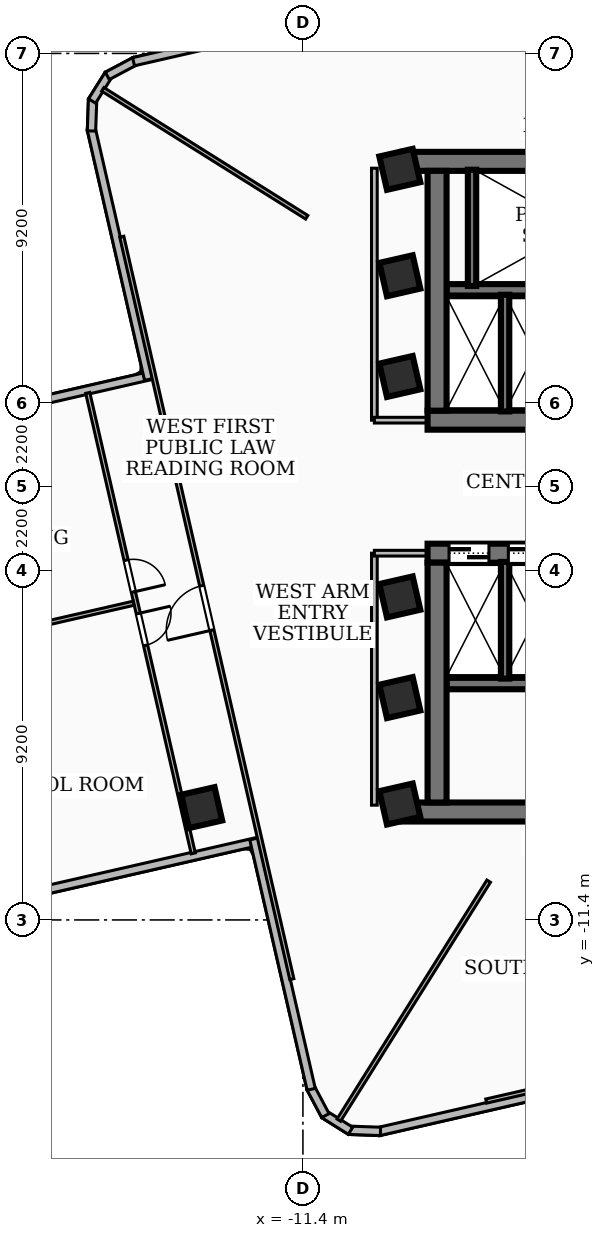
"""IFC4 building model, lengths in metres.
Left out: names, types, materials, properties, quantities, classifications, styles, units other than length and angle.
Written with IfcOpenShell. Run it as: python <this file> out.ifc"""

import sys

from ifc_helpers import new_model, si_unit, direction, frame, frame_2d, origin, origin_2d, place, context, subcontext, project, spatial, rectangle, extrude, element, fill, save


model = new_model("IFC4")
c1 = context("Model", 3, precision=1e-05, world=origin(), true_north=direction((0.0, 1.0)))
c2 = subcontext(c1, "Body", "Model", "MODEL_VIEW")
j1 = project(units=[si_unit("LENGTHUNIT", "METRE"), si_unit("PLANEANGLEUNIT", "RADIAN")], contexts=[c1])
p1 = place(None, origin())
s1 = spatial("IfcSite", under=j1, at=p1, CompositionType="ELEMENT")
p2 = place(p1, origin())
s2 = spatial("IfcBuilding", under=s1, at=p2, CompositionType="ELEMENT")
p3 = place(p2, frame((0.0, 0.0, 123.48)))
s3 = spatial("IfcBuildingStorey", under=s2, at=p3, CompositionType="ELEMENT", Elevation=123.48)
p4 = place(p3, frame((-8.78, 8.56, 0.0), z_axis=(0.0, 0.0, 1.0), x_axis=(1.0, 0.0, 0.0)))
e1 = element("IfcWall", 1, at=p4, inside=s3, PredefinedType="SHEAR", context=c2, shape_type="SweptSolid", body=[
    extrude(rectangle(XDim=17.56, YDim=0.5, at=frame_2d((8.78, 0.0))), origin(), (0.0, 0.0, 1.0), 3.34),
])
p5 = place(p3, frame((8.12, 1.75, 0.0), z_axis=(0.0, 0.0, 1.0), x_axis=(-1.0, 0.0, 0.0)))
e2 = element("IfcWall", 2, at=p5, inside=s3, PredefinedType="SHEAR", context=c2, shape_type="SweptSolid", body=[
    extrude(rectangle(XDim=16.24, YDim=0.5, at=frame_2d((8.12, 0.0))), origin(), (0.0, 0.0, 1.0), 3.34),
])
p6 = place(p5, frame((7.45, 0.0, 0.0)))
e3 = element("IfcOpeningElement", 3, at=p6, cuts=e2, PredefinedType="OPENING", context=c2, shape_type="SweptSolid", body=[
    extrude(rectangle(XDim=1.0, YDim=2.1, at=frame_2d((0.5, 1.05))), frame((0.0, 0.26, 0.0), z_axis=(0.0, -1.0, 0.0), x_axis=(1.0, 0.0, 0.0)), (0.0, 0.0, 1.0), 0.52),
])
p7 = place(p5, frame((3.4, 0.0, 0.0)))
e4 = element("IfcOpeningElement", 4, at=p7, cuts=e2, PredefinedType="OPENING", context=c2, shape_type="SweptSolid", body=[
    extrude(rectangle(XDim=0.9, YDim=2.06, at=frame_2d((0.45, 1.03))), frame((0.0, 0.26, 0.0), z_axis=(0.0, -1.0, 0.0), x_axis=(1.0, 0.0, 0.0)), (0.0, 0.0, 1.0), 0.52),
])
p8 = place(p5, frame((1.1, 0.0, 0.0)))
e5 = element("IfcOpeningElement", 5, at=p8, cuts=e2, PredefinedType="OPENING", context=c2, shape_type="SweptSolid", body=[
    extrude(rectangle(XDim=0.9, YDim=2.06, at=frame_2d((0.45, 1.03))), frame((0.0, 0.26, 0.0), z_axis=(0.0, -1.0, 0.0), x_axis=(1.0, 0.0, 0.0)), (0.0, 0.0, 1.0), 0.52),
])
p9 = place(p3, frame((-7.87, 2.0, 0.0), z_axis=(0.0, 0.0, 1.0), x_axis=(0.0, 1.0, 0.0)))
e6 = element("IfcWall", 6, at=p9, inside=s3, PredefinedType="SHEAR", context=c2, shape_type="SweptSolid", body=[
    extrude(rectangle(XDim=6.31, YDim=0.5, at=frame_2d((3.155, 0.0))), origin(), (0.0, 0.0, 1.0), 3.34),
])
p10 = place(p3, frame((7.62, 5.18, 0.0), z_axis=(0.0, 0.0, 1.0), x_axis=(-1.0, 0.0, 0.0)))
e7 = element("IfcWall", 7, at=p10, inside=s3, PredefinedType="SOLIDWALL", context=c2, shape_type="SweptSolid", body=[
    extrude(rectangle(XDim=15.24, YDim=0.3, at=frame_2d((7.62, 0.0))), origin(), (0.0, 0.0, 1.0), 3.34),
])
p11 = place(p10, frame((5.77, 0.0, 0.0)))
e8 = element("IfcOpeningElement", 8, at=p11, cuts=e7, PredefinedType="OPENING", context=c2, shape_type="SweptSolid", body=[
    extrude(rectangle(XDim=1.1, YDim=2.15, at=frame_2d((0.55, 1.075))), frame((0.0, 0.16, 0.0), z_axis=(0.0, -1.0, 0.0), x_axis=(1.0, 0.0, 0.0)), (0.0, 0.0, 1.0), 0.32),
])
p12 = place(p10, frame((2.97, 0.0, 0.0)))
e9 = element("IfcOpeningElement", 9, at=p12, cuts=e7, PredefinedType="OPENING", context=c2, shape_type="SweptSolid", body=[
    extrude(rectangle(XDim=1.1, YDim=2.15, at=frame_2d((0.55, 1.075))), frame((0.0, 0.16, 0.0), z_axis=(0.0, -1.0, 0.0), x_axis=(1.0, 0.0, 0.0)), (0.0, 0.0, 1.0), 0.32),
])
p13 = place(p10, frame((7.97, 0.0, 0.0)))
e10 = element("IfcOpeningElement", 10, at=p13, cuts=e7, PredefinedType="OPENING", context=c2, shape_type="SweptSolid", body=[
    extrude(rectangle(XDim=1.0, YDim=2.1, at=frame_2d((0.5, 1.05))), frame((0.0, 0.16, 0.0), z_axis=(0.0, -1.0, 0.0), x_axis=(1.0, 0.0, 0.0)), (0.0, 0.0, 1.0), 0.32),
])
p14 = place(p3, frame((8.78, -8.56, 0.0), z_axis=(0.0, 0.0, 1.0), x_axis=(-1.0, 0.0, 0.0)))
e11 = element("IfcWall", 11, at=p14, inside=s3, PredefinedType="SHEAR", context=c2, shape_type="SweptSolid", body=[
    extrude(rectangle(XDim=17.56, YDim=0.5, at=frame_2d((8.78, 0.0))), origin(), (0.0, 0.0, 1.0), 3.34),
])
p15 = place(p3, frame((-8.12, -1.75, 0.0), z_axis=(0.0, 0.0, 1.0), x_axis=(1.0, 0.0, 0.0)))
e12 = element("IfcWall", 12, at=p15, inside=s3, PredefinedType="SHEAR", context=c2, shape_type="SweptSolid", body=[
    extrude(rectangle(XDim=16.24, YDim=0.5, at=frame_2d((8.12, 0.0))), origin(), (0.0, 0.0, 1.0), 3.34),
])
p16 = place(p15, frame((7.45, 0.0, 0.0)))
e13 = element("IfcOpeningElement", 13, at=p16, cuts=e12, PredefinedType="OPENING", context=c2, shape_type="SweptSolid", body=[
    extrude(rectangle(XDim=1.0, YDim=2.1, at=frame_2d((0.5, 1.05))), frame((0.0, 0.26, 0.0), z_axis=(0.0, -1.0, 0.0), x_axis=(1.0, 0.0, 0.0)), (0.0, 0.0, 1.0), 0.52),
])
p17 = place(p15, frame((12.65, 0.0, 0.0)))
e14 = element("IfcOpeningElement", 14, at=p17, cuts=e12, PredefinedType="OPENING", context=c2, shape_type="SweptSolid", body=[
    extrude(rectangle(XDim=0.9, YDim=2.06, at=frame_2d((0.45, 1.03))), frame((0.0, 0.26, 0.0), z_axis=(0.0, -1.0, 0.0), x_axis=(1.0, 0.0, 0.0)), (0.0, 0.0, 1.0), 0.52),
])
p18 = place(p15, frame((0.565, 0.0, 0.0)))
e15 = element("IfcOpeningElement", 15, at=p18, cuts=e12, PredefinedType="OPENING", context=c2, shape_type="SweptSolid", body=[
    extrude(rectangle(XDim=1.05, YDim=2.15, at=frame_2d((0.525, 1.075))), frame((0.0, 0.26, 0.0), z_axis=(0.0, -1.0, 0.0), x_axis=(1.0, 0.0, 0.0)), (0.0, 0.0, 1.0), 0.52),
])
p19 = place(p15, frame((2.125, 0.0, 0.0)))
e16 = element("IfcOpeningElement", 16, at=p19, cuts=e12, PredefinedType="OPENING", context=c2, shape_type="SweptSolid", body=[
    extrude(rectangle(XDim=1.05, YDim=2.15, at=frame_2d((0.525, 1.075))), frame((0.0, 0.26, 0.0), z_axis=(0.0, -1.0, 0.0), x_axis=(1.0, 0.0, 0.0)), (0.0, 0.0, 1.0), 0.52),
])
p20 = place(p15, frame((3.685, 0.0, 0.0)))
e17 = element("IfcOpeningElement", 17, at=p20, cuts=e12, PredefinedType="OPENING", context=c2, shape_type="SweptSolid", body=[
    extrude(rectangle(XDim=1.05, YDim=2.15, at=frame_2d((0.525, 1.075))), frame((0.0, 0.26, 0.0), z_axis=(0.0, -1.0, 0.0), x_axis=(1.0, 0.0, 0.0)), (0.0, 0.0, 1.0), 0.52),
])
p21 = place(p3, frame((-7.87, -8.31, 0.0), z_axis=(0.0, 0.0, 1.0), x_axis=(0.0, 1.0, 0.0)))
e18 = element("IfcWall", 18, at=p21, inside=s3, PredefinedType="SHEAR", context=c2, shape_type="SweptSolid", body=[
    extrude(rectangle(XDim=6.31, YDim=0.5, at=frame_2d((3.155, 0.0))), origin(), (0.0, 0.0, 1.0), 3.34),
])
p22 = place(p3, frame((-7.62, -5.18, 0.0), z_axis=(0.0, 0.0, 1.0), x_axis=(1.0, 0.0, 0.0)))
e19 = element("IfcWall", 19, at=p22, inside=s3, PredefinedType="SOLIDWALL", context=c2, shape_type="SweptSolid", body=[
    extrude(rectangle(XDim=15.24, YDim=0.3, at=frame_2d((7.62, 0.0))), origin(), (0.0, 0.0, 1.0), 3.34),
])
p23 = place(p22, frame((5.77, 0.0, 0.0)))
e20 = element("IfcOpeningElement", 20, at=p23, cuts=e19, PredefinedType="OPENING", context=c2, shape_type="SweptSolid", body=[
    extrude(rectangle(XDim=1.1, YDim=2.15, at=frame_2d((0.55, 1.075))), frame((0.0, 0.16, 0.0), z_axis=(0.0, -1.0, 0.0), x_axis=(1.0, 0.0, 0.0)), (0.0, 0.0, 1.0), 0.32),
])
p24 = place(p22, frame((7.97, 0.0, 0.0)))
e21 = element("IfcOpeningElement", 21, at=p24, cuts=e19, PredefinedType="OPENING", context=c2, shape_type="SweptSolid", body=[
    extrude(rectangle(XDim=1.0, YDim=2.1, at=frame_2d((0.5, 1.05))), frame((0.0, 0.16, 0.0), z_axis=(0.0, -1.0, 0.0), x_axis=(1.0, 0.0, 0.0)), (0.0, 0.0, 1.0), 0.32),
])
p25 = place(p3, frame((-6.95, 5.28, 0.0), z_axis=(0.0, 0.0, 1.0), x_axis=(0.0, 1.0, 0.0)))
e22 = element("IfcWall", 22, at=p25, inside=s3, PredefinedType="SOLIDWALL", context=c2, shape_type="SweptSolid", body=[
    extrude(rectangle(XDim=3.06, YDim=0.22, at=frame_2d((1.53, 0.0))), origin(), (0.0, 0.0, 1.0), 3.34),
])
for number, where, z_axis, x_axis in (
    (23, (-6.08, 1.98, 0.0), (0.0, 0.0, 1.0), (0.0, 1.0, 0.0)),
    (24, (-6.08, -5.05, 0.0), (0.0, 0.0, 1.0), (0.0, 1.0, 0.0)),
):
    element("IfcWall", number, at=place(p3, frame(where, z_axis=z_axis, x_axis=x_axis)), inside=s3, PredefinedType="SOLIDWALL", context=c2, shape_type="SweptSolid", body=[
        extrude(rectangle(XDim=3.07, YDim=0.22, at=frame_2d((1.535, 0.0))), origin(), (0.0, 0.0, 1.0), 3.34),
    ])
for number, where, z_axis, x_axis in (
    (25, (-8.85, -5.55, 0.0), (0.0, 0.0, 1.0), (0.975, 0.223, 0.0)),
    (26, (-8.85, -2.9, 0.0), (0.0, 0.0, 1.0), (0.975, 0.223, 0.0)),
    (27, (-8.85, 2.9, 0.0), (0.0, 0.0, 1.0), (0.975, 0.223, 0.0)),
    (28, (-8.85, 5.55, 0.0), (0.0, 0.0, 1.0), (0.975, 0.223, 0.0)),
    (29, (-8.85, 8.35, 0.0), (0.0, 0.0, 1.0), (0.975, 0.223, 0.0)),
    (30, (-8.85, -8.35, 0.0), (0.0, 0.0, 1.0), (0.975, 0.223, 0.0)),
    (31, (-14.064, -8.445, 0.0), (0.0, 0.0, 1.0), (0.975, 0.223, 0.0)),
):
    element("IfcColumn", number, at=place(p3, frame(where, z_axis=z_axis, x_axis=x_axis)), inside=s3, PredefinedType="COLUMN", context=c2, shape_type="SweptSolid", body=[
        extrude(rectangle(XDim=0.9, YDim=0.9, at=origin_2d()), origin(), (0.0, 0.0, 1.0), 3.6),
    ])
p26 = place(p3, frame((-12.585, -9.335, 0.0), z_axis=(0.0, 0.0, 1.0), x_axis=(-0.974754036658, -0.223281365141, 0.0)))
e32 = element("IfcWall", 32, at=p26, inside=s3, PredefinedType="SOLIDWALL", context=c2, shape_type="SweptSolid", body=[
    extrude(rectangle(XDim=13.459, YDim=0.22, at=frame_2d((6.729, 0.0))), origin(), (0.0, 0.0, 1.0), 2.644),
])
p27 = place(p3, frame((-28.512, -0.078, 0.0), z_axis=(0.0, 0.0, 1.0), x_axis=(0.974753462872, 0.223283870038, 0.0)))
e33 = element("IfcWall", 33, at=p27, inside=s3, PredefinedType="SOLIDWALL", context=c2, shape_type="SweptSolid", body=[
    extrude(rectangle(XDim=13.458, YDim=0.22, at=frame_2d((6.729, 0.0))), origin(), (0.0, 0.0, 1.0), 3.34),
])
p28 = place(p27, frame((1.1, 0.0, 0.85)))
e34 = element("IfcOpeningElement", 34, at=p28, cuts=e33, PredefinedType="OPENING", context=c2, shape_type="SweptSolid", body=[
    extrude(rectangle(XDim=1.5, YDim=1.5, at=frame_2d((0.75, 0.75))), frame((0.0, 0.12, 0.0), z_axis=(0.0, -1.0, 0.0), x_axis=(1.0, 0.0, 0.0)), (0.0, 0.0, 1.0), 0.24),
])
p29 = place(p3, frame((-15.46, 2.821, 0.0), z_axis=(0.0, 0.0, 1.0), x_axis=(-0.223278912438, 0.974754598481, 0.0)))
e35 = element("IfcWall", 35, at=p29, inside=s3, PredefinedType="SOLIDWALL", context=c2, shape_type="SweptSolid", body=[
    extrude(rectangle(XDim=6.759, YDim=0.22, at=frame_2d((3.379, 0.0))), origin(), (0.0, 0.0, 1.0), 3.34),
])
p30 = place(p3, frame((-16.964, 9.36, 0.0), z_axis=(0.0, 0.0, 1.0), x_axis=(0.035983706773, 0.999352376715, 0.0)))
e36 = element("IfcWall", 36, at=p30, inside=s3, PredefinedType="SOLIDWALL", context=c2, shape_type="SweptSolid", body=[
    extrude(rectangle(XDim=0.834, YDim=0.22, at=frame_2d((0.417, 0.0))), origin(), (0.0, 0.0, 1.0), 3.34),
])
p31 = place(p3, frame((-16.948, 10.148, 0.0), z_axis=(0.0, 0.0, 1.0), x_axis=(0.531096868492, 0.847311109497, 0.0)))
e37 = element("IfcWall", 37, at=p31, inside=s3, PredefinedType="SOLIDWALL", context=c2, shape_type="SweptSolid", body=[
    extrude(rectangle(XDim=0.819, YDim=0.22, at=frame_2d((0.41, 0.0))), origin(), (0.0, 0.0, 1.0), 3.34),
])
p32 = place(p3, frame((-16.548, 10.809, 0.0), z_axis=(0.0, 0.0, 1.0), x_axis=(0.883460266876, 0.468506090516, 0.0)))
e38 = element("IfcWall", 38, at=p32, inside=s3, PredefinedType="SOLIDWALL", context=c2, shape_type="SweptSolid", body=[
    extrude(rectangle(XDim=0.834, YDim=0.22, at=frame_2d((0.417, 0.0))), origin(), (0.0, 0.0, 1.0), 3.34),
])
p33 = place(p3, frame((-15.857, 11.182, 0.0), z_axis=(0.0, 0.0, 1.0), x_axis=(0.974754598481, 0.223278912438, 0.0)))
e39 = element("IfcWall", 39, at=p33, inside=s3, PredefinedType="SOLIDWALL", context=c2, shape_type="SweptSolid", body=[
    extrude(rectangle(XDim=6.759, YDim=0.22, at=frame_2d((3.379, 0.0))), origin(), (0.0, 0.0, 1.0), 3.34),
])
p34 = place(p3, frame((-2.821, -15.46, 0.0), z_axis=(0.0, 0.0, 1.0), x_axis=(-0.974754598481, -0.223278912438, 0.0)))
e40 = element("IfcWall", 40, at=p34, inside=s3, PredefinedType="SOLIDWALL", context=c2, shape_type="SweptSolid", body=[
    extrude(rectangle(XDim=6.759, YDim=0.22, at=frame_2d((3.379, 0.0))), origin(), (0.0, 0.0, 1.0), 2.57),
])
p35 = place(p3, frame((-9.36, -16.964, 0.0), z_axis=(0.0, 0.0, 1.0), x_axis=(-0.999352376715, 0.035983706773, 0.0)))
e41 = element("IfcWall", 41, at=p35, inside=s3, PredefinedType="SOLIDWALL", context=c2, shape_type="SweptSolid", body=[
    extrude(rectangle(XDim=0.834, YDim=0.22, at=frame_2d((0.417, 0.0))), origin(), (0.0, 0.0, 1.0), 3.34),
])
p36 = place(p3, frame((-10.148, -16.948, 0.0), z_axis=(0.0, 0.0, 1.0), x_axis=(-0.847311109497, 0.531096868492, 0.0)))
e42 = element("IfcWall", 42, at=p36, inside=s3, PredefinedType="SOLIDWALL", context=c2, shape_type="SweptSolid", body=[
    extrude(rectangle(XDim=0.819, YDim=0.22, at=frame_2d((0.41, 0.0))), origin(), (0.0, 0.0, 1.0), 3.34),
])
p37 = place(p3, frame((-10.809, -16.548, 0.0), z_axis=(0.0, 0.0, 1.0), x_axis=(-0.468506090516, 0.883460266876, 0.0)))
e43 = element("IfcWall", 43, at=p37, inside=s3, PredefinedType="SOLIDWALL", context=c2, shape_type="SweptSolid", body=[
    extrude(rectangle(XDim=0.834, YDim=0.22, at=frame_2d((0.417, 0.0))), origin(), (0.0, 0.0, 1.0), 3.34),
])
p38 = place(p3, frame((-11.182, -15.857, 0.0), z_axis=(0.0, 0.0, 1.0), x_axis=(-0.223278912438, 0.974754598481, 0.0)))
e44 = element("IfcWall", 44, at=p38, inside=s3, PredefinedType="SOLIDWALL", context=c2, shape_type="SweptSolid", body=[
    extrude(rectangle(XDim=6.759, YDim=0.22, at=frame_2d((3.379, 0.0))), origin(), (0.0, 0.0, 1.0), 2.644),
])
p39 = place(p3, frame((-9.52, 1.75, 0.0), z_axis=(0.0, 0.0, 1.0), x_axis=(0.0, 1.0, 0.0)))
e45 = element("IfcWall", 45, at=p39, inside=s3, PredefinedType="PARTITIONING", context=c2, shape_type="SweptSolid", body=[
    extrude(rectangle(XDim=6.63, YDim=0.15, at=frame_2d((3.315, 0.0))), origin(), (0.0, 0.0, 1.0), 2.57),
])
p40 = place(p3, frame((-7.85, 1.75, 0.0), z_axis=(0.0, 0.0, 1.0), x_axis=(-1.0, 0.0, 0.0)))
e46 = element("IfcWall", 46, at=p40, inside=s3, PredefinedType="PARTITIONING", context=c2, shape_type="SweptSolid", body=[
    extrude(rectangle(XDim=1.67, YDim=0.15, at=frame_2d((0.835, 0.0))), origin(), (0.0, 0.0, 1.0), 2.57),
])
p41 = place(p3, frame((-9.52, -8.38, 0.0), z_axis=(0.0, 0.0, 1.0), x_axis=(0.0, 1.0, 0.0)))
e47 = element("IfcWall", 47, at=p41, inside=s3, PredefinedType="PARTITIONING", context=c2, shape_type="SweptSolid", body=[
    extrude(rectangle(XDim=6.63, YDim=0.15, at=frame_2d((3.315, 0.0))), origin(), (0.0, 0.0, 1.0), 2.57),
])
p42 = place(p3, frame((-7.85, -1.75, 0.0), z_axis=(0.0, 0.0, 1.0), x_axis=(-1.0, 0.0, 0.0)))
e48 = element("IfcWall", 48, at=p42, inside=s3, PredefinedType="PARTITIONING", context=c2, shape_type="SweptSolid", body=[
    extrude(rectangle(XDim=1.67, YDim=0.15, at=frame_2d((0.835, 0.0))), origin(), (0.0, 0.0, 1.0), 2.57),
])
p43 = place(p3, frame((-11.3, 7.089, 0.0), z_axis=(0.0, 0.0, 1.0), x_axis=(-0.847172398776, 0.531318103167, 0.0)))
e49 = element("IfcWall", 49, at=p43, inside=s3, PredefinedType="PARTITIONING", context=c2, shape_type="SweptSolid", body=[
    extrude(rectangle(XDim=6.335, YDim=0.11, at=frame_2d((3.167, 0.0))), origin(), (0.0, 0.0, 1.0), 3.34),
])
p44 = place(p3, frame((-6.512, -10.38, 0.0), z_axis=(0.0, 0.0, 1.0), x_axis=(-0.531323053356, -0.847169294163, 0.0)))
e50 = element("IfcWall", 50, at=p44, inside=s3, PredefinedType="PARTITIONING", context=c2, shape_type="SweptSolid", body=[
    extrude(rectangle(XDim=7.421, YDim=0.11, at=frame_2d((3.711, 0.0))), origin(), (0.0, 0.0, 1.0), 2.57),
])
p45 = place(p3, frame((-11.692, -12.957, 0.0), z_axis=(0.0, 0.0, 1.0), x_axis=(-0.223262093598, 0.97475845088, 0.0)))
e51 = element("IfcWall", 51, at=p45, inside=s3, PredefinedType="PARTITIONING", context=c2, shape_type="SweptSolid", body=[
    extrude(rectangle(XDim=20.04, YDim=0.11, at=frame_2d((10.02, 0.0))), origin(), (0.0, 0.0, 1.0), 2.57),
])
p46 = place(p45, frame((9.42, 0.0, 0.0)))
e52 = element("IfcOpeningElement", 52, at=p46, cuts=e51, PredefinedType="OPENING", context=c2, shape_type="SweptSolid", body=[
    extrude(rectangle(XDim=1.2, YDim=2.1, at=frame_2d((0.6, 1.05))), frame((0.0, 0.065, 0.0), z_axis=(0.0, -1.0, 0.0), x_axis=(1.0, 0.0, 0.0)), (0.0, 0.0, 1.0), 0.13),
])
p47 = place(p3, frame((-15.855, -3.067, 0.0), z_axis=(0.0, 0.0, 1.0), x_axis=(-0.974758398925, -0.223262320434, 0.0)))
e53 = element("IfcWall", 53, at=p47, inside=s3, PredefinedType="PARTITIONING", context=c2, shape_type="SweptSolid", body=[
    extrude(rectangle(XDim=13.075, YDim=0.11, at=frame_2d((6.538, 0.0))), origin(), (0.0, 0.0, 1.0), 2.72),
])
p48 = place(p3, frame((-17.062, 2.468, 0.0), z_axis=(0.0, 0.0, 1.0), x_axis=(0.223341555051, -0.974740247341, 0.0)))
e54 = element("IfcWall", 54, at=p48, inside=s3, PredefinedType="PARTITIONING", context=c2, shape_type="SweptSolid", body=[
    extrude(rectangle(XDim=12.43, YDim=0.11, at=frame_2d((6.215, 0.0))), origin(), (0.0, 0.0, 1.0), 2.57),
])
p49 = place(p48, frame((4.515, 0.0, 0.0)))
e55 = element("IfcOpeningElement", 55, at=p49, cuts=e54, PredefinedType="OPENING", context=c2, shape_type="SweptSolid", body=[
    extrude(rectangle(XDim=0.86, YDim=2.04, at=frame_2d((0.43, 1.02))), frame((0.0, 0.065, 0.0), z_axis=(0.0, -1.0, 0.0), x_axis=(1.0, 0.0, 0.0)), (0.0, 0.0, 1.0), 0.13),
])
p50 = place(p48, frame((5.955, 0.0, 0.0)))
e56 = element("IfcOpeningElement", 56, at=p50, cuts=e54, PredefinedType="OPENING", context=c2, shape_type="SweptSolid", body=[
    extrude(rectangle(XDim=0.86, YDim=2.04, at=frame_2d((0.43, 1.02))), frame((0.0, 0.065, 0.0), z_axis=(0.0, -1.0, 0.0), x_axis=(1.0, 0.0, 0.0)), (0.0, 0.0, 1.0), 0.13),
])
p51 = place(p3, frame((12.957, -11.692, 0.0), z_axis=(0.0, 0.0, 1.0), x_axis=(-0.97475845088, -0.223262093598, 0.0)))
e57 = element("IfcWall", 57, at=p51, inside=s3, PredefinedType="PARTITIONING", context=c2, shape_type="SweptSolid", body=[
    extrude(rectangle(XDim=20.04, YDim=0.11, at=frame_2d((10.02, 0.0))), origin(), (0.0, 0.0, 1.0), 2.57),
])
p52 = place(p51, frame((9.42, 0.0, 0.0)))
e58 = element("IfcOpeningElement", 58, at=p52, cuts=e57, PredefinedType="OPENING", context=c2, shape_type="SweptSolid", body=[
    extrude(rectangle(XDim=1.2, YDim=2.1, at=frame_2d((0.6, 1.05))), frame((0.0, 0.065, 0.0), z_axis=(0.0, -1.0, 0.0), x_axis=(1.0, 0.0, 0.0)), (0.0, 0.0, 1.0), 0.13),
])
p53 = place(p18, origin())
e59 = element("IfcDoor", 59, at=p53, inside=s3, OperationType="DOUBLE_DOOR_SLIDING", PredefinedType="DOOR", context=c2, shape_type="SweptSolid", body=[
    extrude(rectangle(XDim=1.05, YDim=2.15, at=frame_2d((0.525, 1.075))), frame((0.0, 0.025, 0.0), z_axis=(0.0, -1.0, 0.0), x_axis=(1.0, 0.0, 0.0)), (0.0, 0.0, 1.0), 0.05),
])
fill(e15, e59)
p54 = place(p19, origin())
e60 = element("IfcDoor", 60, at=p54, inside=s3, OperationType="DOUBLE_DOOR_SLIDING", PredefinedType="DOOR", context=c2, shape_type="SweptSolid", body=[
    extrude(rectangle(XDim=1.05, YDim=2.15, at=frame_2d((0.525, 1.075))), frame((0.0, 0.025, 0.0), z_axis=(0.0, -1.0, 0.0), x_axis=(1.0, 0.0, 0.0)), (0.0, 0.0, 1.0), 0.05),
])
fill(e16, e60)
p55 = place(p46, origin())
e61 = element("IfcDoor", 61, at=p55, inside=s3, OperationType="SINGLE_SWING_LEFT", PredefinedType="DOOR", context=c2, shape_type="SweptSolid", body=[
    extrude(rectangle(XDim=1.2, YDim=2.1, at=frame_2d((0.6, 1.05))), frame((0.0, 0.025, 0.0), z_axis=(0.0, -1.0, 0.0), x_axis=(1.0, 0.0, 0.0)), (0.0, 0.0, 1.0), 0.05),
])
fill(e52, e61)
p56 = place(p49, origin())
e62 = element("IfcDoor", 62, at=p56, inside=s3, OperationType="SINGLE_SWING_RIGHT", PredefinedType="DOOR", context=c2, shape_type="SweptSolid", body=[
    extrude(rectangle(XDim=0.86, YDim=2.04, at=frame_2d((0.43, 1.02))), frame((0.0, 0.025, 0.0), z_axis=(0.0, -1.0, 0.0), x_axis=(1.0, 0.0, 0.0)), (0.0, 0.0, 1.0), 0.05),
])
fill(e55, e62)
p57 = place(p50, origin())
e63 = element("IfcDoor", 63, at=p57, inside=s3, OperationType="SINGLE_SWING_LEFT", PredefinedType="DOOR", context=c2, shape_type="SweptSolid", body=[
    extrude(rectangle(XDim=0.86, YDim=2.04, at=frame_2d((0.43, 1.02))), frame((0.0, 0.025, 0.0), z_axis=(0.0, -1.0, 0.0), x_axis=(1.0, 0.0, 0.0)), (0.0, 0.0, 1.0), 0.05),
])
fill(e56, e63)
save(model, sys.argv[1])
